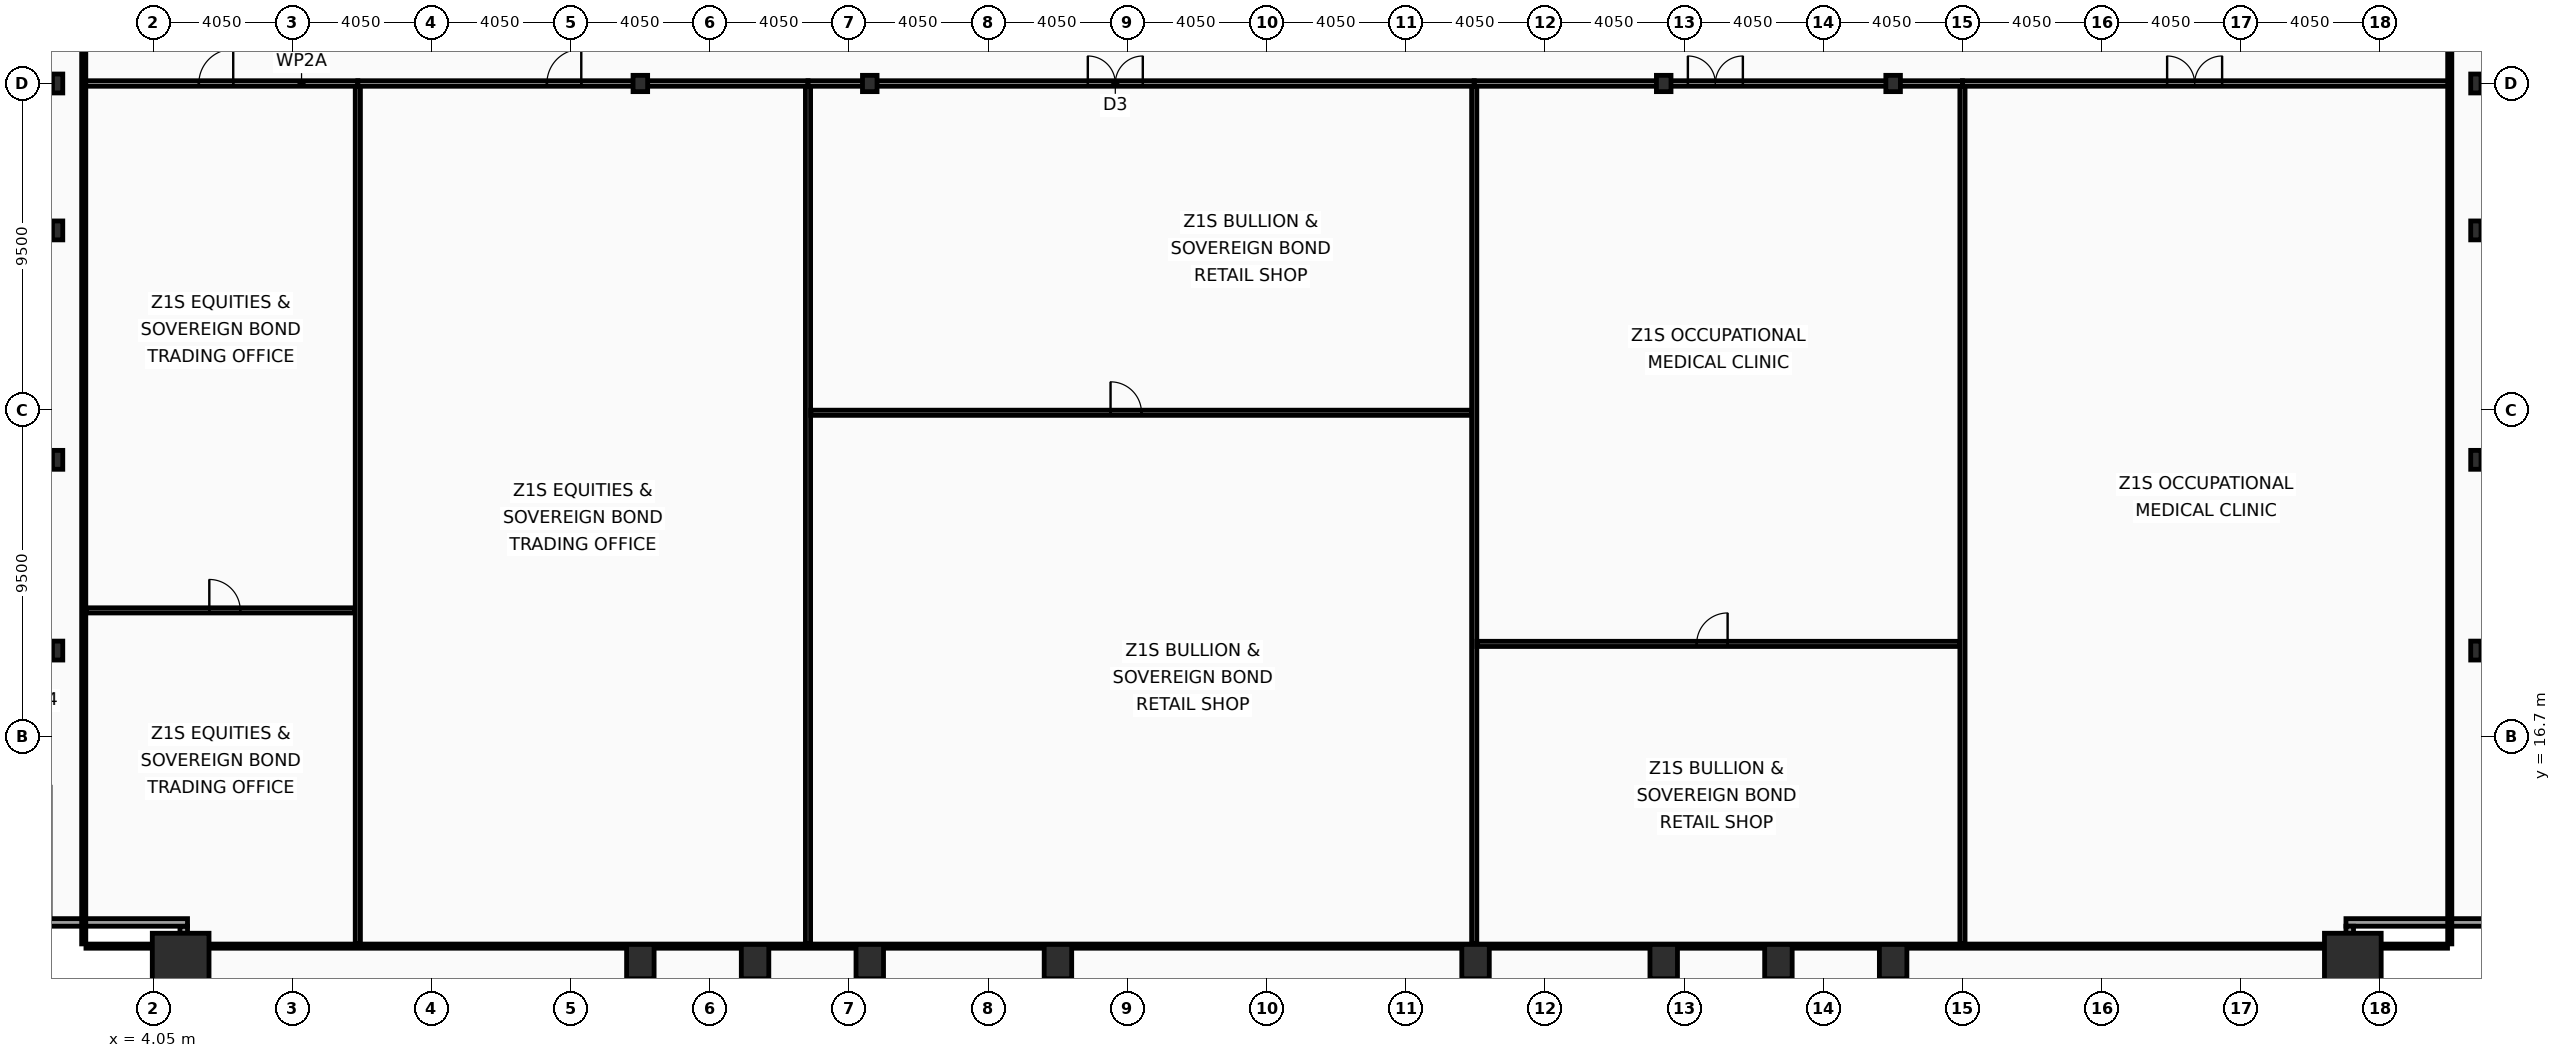
"""IFC4 building model, lengths in metres.
Left out: names, types, materials, properties, quantities, classifications, styles, units other than length and angle.
Written with IfcOpenShell. Run it as: python <this file> out.ifc"""

import sys

from ifc_helpers import new_model, si_unit, direction, frame, frame_2d, origin, origin_2d, place, context, subcontext, project, spatial, rectangle, hollow_rectangle, i_section, extrude, element, fill, save


model = new_model("IFC4")
c1 = context("Model", 3, precision=1e-05, world=origin(), true_north=direction((0.0, 1.0)))
c2 = subcontext(c1, "Body", "Model", "MODEL_VIEW")
j1 = project(units=[si_unit("LENGTHUNIT", "METRE"), si_unit("PLANEANGLEUNIT", "RADIAN")], contexts=[c1])
p1 = place(None, origin())
s1 = spatial("IfcSite", under=j1, at=p1, CompositionType="ELEMENT")
p2 = place(p1, origin())
s2 = spatial("IfcBuilding", under=s1, at=p2, CompositionType="ELEMENT")
p3 = place(p2, frame((0.0, 0.0, 33.8)))
s3 = spatial("IfcBuildingStorey", under=s2, at=p3, CompositionType="ELEMENT", Elevation=33.8)
for number, where, z_axis, x_axis in (
    (1, (4.85, 10.15, 0.0), (0.0, 0.0, 1.0), (1.0, 0.0, 0.0)),
    (2, (68.05, 10.15, 0.0), (0.0, 0.0, 1.0), (1.0, 0.0, 0.0)),
):
    element("IfcColumn", number, at=place(p3, frame(where, z_axis=z_axis, x_axis=x_axis)), inside=s3, PredefinedType="COLUMN", context=c2, shape_type="SweptSolid", body=[
        extrude(hollow_rectangle(XDim=1.65, YDim=1.65, WallThickness=0.075, at=origin_2d()), origin(), (0.0, 0.0, 1.0), 4.0),
    ])
for number, where, z_axis, x_axis in (
    (3, (18.225, 10.15, 0.0), (0.0, 0.0, 1.0), (1.0, 0.0, 0.0)),
    (4, (21.562, 10.15, 0.0), (0.0, 0.0, 1.0), (1.0, 0.0, 0.0)),
    (5, (24.9, 10.15, 0.0), (0.0, 0.0, 1.0), (1.0, 0.0, 0.0)),
    (6, (30.375, 10.15, 0.0), (0.0, 0.0, 1.0), (1.0, 0.0, 0.0)),
    (7, (42.525, 10.15, 0.0), (0.0, 0.0, 1.0), (1.0, 0.0, 0.0)),
    (8, (48.0, 10.15, 0.0), (0.0, 0.0, 1.0), (1.0, 0.0, 0.0)),
    (9, (51.337, 10.15, 0.0), (0.0, 0.0, 1.0), (1.0, 0.0, 0.0)),
    (10, (54.675, 10.15, 0.0), (0.0, 0.0, 1.0), (1.0, 0.0, 0.0)),
):
    element("IfcColumn", number, at=place(p3, frame(where, z_axis=z_axis, x_axis=x_axis)), inside=s3, PredefinedType="COLUMN", context=c2, shape_type="SweptSolid", body=[
        extrude(hollow_rectangle(XDim=0.8, YDim=1.0, WallThickness=0.055, at=origin_2d()), origin(), (0.0, 0.0, 1.0), 4.0),
    ])
for number, where, z_axis, x_axis in (
    (11, (1.27, 19.2, 0.0), (0.0, 0.0, 1.0), (1.0, 0.0, 0.0)),
    (12, (1.27, 24.75, 0.0), (0.0, 0.0, 1.0), (1.0, 0.0, 0.0)),
    (13, (1.27, 31.425, 0.0), (0.0, 0.0, 1.0), (1.0, 0.0, 0.0)),
    (14, (1.27, 35.7, 0.0), (0.0, 0.0, 1.0), (1.0, 0.0, 0.0)),
    (15, (71.63, 19.2, 0.0), (0.0, 0.0, 1.0), (1.0, 0.0, 0.0)),
    (16, (71.63, 24.75, 0.0), (0.0, 0.0, 1.0), (1.0, 0.0, 0.0)),
    (17, (71.63, 31.425, 0.0), (0.0, 0.0, 1.0), (1.0, 0.0, 0.0)),
    (18, (71.63, 35.7, 0.0), (0.0, 0.0, 1.0), (1.0, 0.0, 0.0)),
):
    element("IfcColumn", number, at=place(p3, frame(where, z_axis=z_axis, x_axis=x_axis)), inside=s3, PredefinedType="COLUMN", context=c2, shape_type="SweptSolid", body=[
        extrude(i_section(OverallWidth=0.3, OverallDepth=0.55, WebThickness=0.015, FlangeThickness=0.029, at=origin_2d()), origin(), (0.0, 0.0, 1.0), 4.0),
    ])
for number, where, z_axis, x_axis in (
    (19, (18.225, 35.7, 0.0), (0.0, 0.0, 1.0), (1.0, 0.0, 0.0)),
    (20, (24.9, 35.7, 0.0), (0.0, 0.0, 1.0), (1.0, 0.0, 0.0)),
    (21, (48.0, 35.7, 0.0), (0.0, 0.0, 1.0), (1.0, 0.0, 0.0)),
    (22, (54.675, 35.7, 0.0), (0.0, 0.0, 1.0), (1.0, 0.0, 0.0)),
):
    element("IfcColumn", number, at=place(p3, frame(where, z_axis=z_axis, x_axis=x_axis)), inside=s3, PredefinedType="COLUMN", context=c2, shape_type="SweptSolid", body=[
        extrude(i_section(OverallWidth=0.424, OverallDepth=0.474, WebThickness=0.048, FlangeThickness=0.077, at=origin_2d()), origin(), (0.0, 0.0, 1.0), 4.0),
    ])
p4 = place(p3, frame((4.94, 7.27, 0.0), z_axis=(0.0, 0.0, 1.0), x_axis=(0.0, 1.0, 0.0)))
e23 = element("IfcWall", 23, at=p4, inside=s3, PredefinedType="SOLIDWALL", context=c2, shape_type="SweptSolid", body=[
    extrude(rectangle(XDim=3.91, YDim=0.22, at=frame_2d((1.955, 0.0))), origin(), (0.0, 0.0, 1.0), 3.16),
])
for number, where, z_axis, x_axis in (
    (24, (5.05, 11.29, 0.0), (0.0, 0.0, 1.0), (-1.0, 0.0, 0.0)),
    (25, (72.07, 11.29, 0.0), (0.0, 0.0, 1.0), (-1.0, 0.0, 0.0)),
):
    element("IfcWall", number, at=place(p3, frame(where, z_axis=z_axis, x_axis=x_axis)), inside=s3, PredefinedType="SOLIDWALL", context=c2, shape_type="SweptSolid", body=[
        extrude(rectangle(XDim=4.22, YDim=0.22, at=frame_2d((2.11, 0.0))), origin(), (0.0, 0.0, 1.0), 3.16),
    ])
p5 = place(p3, frame((67.96, 11.18, 0.0), z_axis=(0.0, 0.0, 1.0), x_axis=(0.0, -1.0, 0.0)))
e26 = element("IfcWall", 26, at=p5, inside=s3, PredefinedType="SOLIDWALL", context=c2, shape_type="SweptSolid", body=[
    extrude(rectangle(XDim=3.91, YDim=0.22, at=frame_2d((1.955, 0.0))), origin(), (0.0, 0.0, 1.0), 3.16),
])
p6 = place(p3, frame((2.03, 35.7, 0.0), z_axis=(0.0, 0.0, 1.0), x_axis=(1.0, 0.0, 0.0)))
e27 = element("IfcWall", 27, at=p6, inside=s3, PredefinedType="PARTITIONING", context=c2, shape_type="SweptSolid", body=[
    extrude(rectangle(XDim=7.975, YDim=0.16, at=frame_2d((3.987, 0.0))), origin(), (0.0, 0.0, 1.0), 3.01),
])
p7 = place(p6, frame((3.35, 0.0, 0.0)))
e28 = element("IfcOpeningElement", 28, at=p7, cuts=e27, PredefinedType="OPENING", context=c2, shape_type="SweptSolid", body=[
    extrude(rectangle(XDim=1.0, YDim=2.05, at=frame_2d((0.5, 1.025))), frame((0.0, 0.09, 0.0), z_axis=(0.0, -1.0, 0.0), x_axis=(1.0, 0.0, 0.0)), (0.0, 0.0, 1.0), 0.18),
])
p8 = place(p3, frame((2.095, 20.369, 0.0), z_axis=(0.0, 0.0, 1.0), x_axis=(1.0, 0.0, 0.0)))
e29 = element("IfcWall", 29, at=p8, inside=s3, PredefinedType="PARTITIONING", context=c2, shape_type="SweptSolid", body=[
    extrude(rectangle(XDim=7.83, YDim=0.15, at=frame_2d((3.915, 0.0))), origin(), (0.0, 0.0, 1.0), 3.82),
])
p9 = place(p8, frame((3.589, 0.0, 0.0)))
e30 = element("IfcOpeningElement", 30, at=p9, cuts=e29, PredefinedType="OPENING", context=c2, shape_type="SweptSolid", body=[
    extrude(rectangle(XDim=0.9, YDim=2.05, at=frame_2d((0.45, 1.025))), frame((0.0, 0.085, 0.0), z_axis=(0.0, -1.0, 0.0), x_axis=(1.0, 0.0, 0.0)), (0.0, 0.0, 1.0), 0.17),
])
p10 = place(p3, frame((10.005, 35.7, 0.0), z_axis=(0.0, 0.0, 1.0), x_axis=(1.0, 0.0, 0.0)))
e31 = element("IfcWall", 31, at=p10, inside=s3, PredefinedType="PARTITIONING", context=c2, shape_type="SweptSolid", body=[
    extrude(rectangle(XDim=13.098, YDim=0.16, at=frame_2d((6.549, 0.0))), origin(), (0.0, 0.0, 1.0), 3.01),
])
p11 = place(p10, frame((5.501, 0.0, 0.0)))
e32 = element("IfcOpeningElement", 32, at=p11, cuts=e31, PredefinedType="OPENING", context=c2, shape_type="SweptSolid", body=[
    extrude(rectangle(XDim=1.0, YDim=2.05, at=frame_2d((0.5, 1.025))), frame((0.0, 0.09, 0.0), z_axis=(0.0, -1.0, 0.0), x_axis=(1.0, 0.0, 0.0)), (0.0, 0.0, 1.0), 0.18),
])
p12 = place(p3, frame((10.005, 10.665, 0.0), z_axis=(0.0, 0.0, 1.0), x_axis=(0.0, 1.0, 0.0)))
e33 = element("IfcWall", 33, at=p12, inside=s3, PredefinedType="PARTITIONING", context=c2, shape_type="SweptSolid", body=[
    extrude(rectangle(XDim=24.95, YDim=0.15, at=frame_2d((12.475, 0.0))), origin(), (0.0, 0.0, 1.0), 3.01),
])
p13 = place(p3, frame((23.103, 35.7, 0.0), z_axis=(0.0, 0.0, 1.0), x_axis=(1.0, 0.0, 0.0)))
e34 = element("IfcWall", 34, at=p13, inside=s3, PredefinedType="PARTITIONING", context=c2, shape_type="SweptSolid", body=[
    extrude(rectangle(XDim=19.384, YDim=0.16, at=frame_2d((9.692, 0.0))), origin(), (0.0, 0.0, 1.0), 3.01),
])
p14 = place(p13, frame((8.141, 0.0, 0.0)))
e35 = element("IfcOpeningElement", 35, at=p14, cuts=e34, PredefinedType="OPENING", context=c2, shape_type="SweptSolid", body=[
    extrude(rectangle(XDim=1.6, YDim=2.15, at=frame_2d((0.8, 1.075))), frame((0.0, 0.09, 0.0), z_axis=(0.0, -1.0, 0.0), x_axis=(1.0, 0.0, 0.0)), (0.0, 0.0, 1.0), 0.18),
])
p15 = place(p3, frame((23.103, 10.665, 0.0), z_axis=(0.0, 0.0, 1.0), x_axis=(0.0, 1.0, 0.0)))
e36 = element("IfcWall", 36, at=p15, inside=s3, PredefinedType="PARTITIONING", context=c2, shape_type="SweptSolid", body=[
    extrude(rectangle(XDim=24.95, YDim=0.15, at=frame_2d((12.475, 0.0))), origin(), (0.0, 0.0, 1.0), 3.21),
])
p16 = place(p3, frame((23.183, 26.119, 0.0), z_axis=(0.0, 0.0, 1.0), x_axis=(1.0, 0.0, 0.0)))
e37 = element("IfcWall", 37, at=p16, inside=s3, PredefinedType="PARTITIONING", context=c2, shape_type="SweptSolid", body=[
    extrude(rectangle(XDim=19.224, YDim=0.15, at=frame_2d((9.612, 0.0))), origin(), (0.0, 0.0, 1.0), 3.01),
])
p17 = place(p16, frame((8.723, 0.0, 0.0)))
e38 = element("IfcOpeningElement", 38, at=p17, cuts=e37, PredefinedType="OPENING", context=c2, shape_type="SweptSolid", body=[
    extrude(rectangle(XDim=0.9, YDim=2.05, at=frame_2d((0.45, 1.025))), frame((0.0, 0.085, 0.0), z_axis=(0.0, -1.0, 0.0), x_axis=(1.0, 0.0, 0.0)), (0.0, 0.0, 1.0), 0.17),
])
p18 = place(p3, frame((42.487, 35.7, 0.0), z_axis=(0.0, 0.0, 1.0), x_axis=(1.0, 0.0, 0.0)))
e39 = element("IfcWall", 39, at=p18, inside=s3, PredefinedType="PARTITIONING", context=c2, shape_type="SweptSolid", body=[
    extrude(rectangle(XDim=14.205, YDim=0.16, at=frame_2d((7.103, 0.0))), origin(), (0.0, 0.0, 1.0), 3.01),
])
p19 = place(p18, frame((6.216, 0.0, 0.0)))
e40 = element("IfcOpeningElement", 40, at=p19, cuts=e39, PredefinedType="OPENING", context=c2, shape_type="SweptSolid", body=[
    extrude(rectangle(XDim=1.6, YDim=2.15, at=frame_2d((0.8, 1.075))), frame((0.0, 0.09, 0.0), z_axis=(0.0, -1.0, 0.0), x_axis=(1.0, 0.0, 0.0)), (0.0, 0.0, 1.0), 0.18),
])
p20 = place(p3, frame((42.487, 10.665, 0.0), z_axis=(0.0, 0.0, 1.0), x_axis=(0.0, 1.0, 0.0)))
e41 = element("IfcWall", 41, at=p20, inside=s3, PredefinedType="PARTITIONING", context=c2, shape_type="SweptSolid", body=[
    extrude(rectangle(XDim=24.95, YDim=0.15, at=frame_2d((12.475, 0.0))), origin(), (0.0, 0.0, 1.0), 3.01),
])
p21 = place(p3, frame((42.567, 19.395, 0.0), z_axis=(0.0, 0.0, 1.0), x_axis=(1.0, 0.0, 0.0)))
e42 = element("IfcWall", 42, at=p21, inside=s3, PredefinedType="PARTITIONING", context=c2, shape_type="SweptSolid", body=[
    extrude(rectangle(XDim=14.046, YDim=0.15, at=frame_2d((7.023, 0.0))), origin(), (0.0, 0.0, 1.0), 3.01),
])
p22 = place(p21, frame((6.393, 0.0, 0.0)))
e43 = element("IfcOpeningElement", 43, at=p22, cuts=e42, PredefinedType="OPENING", context=c2, shape_type="SweptSolid", body=[
    extrude(rectangle(XDim=0.9, YDim=2.05, at=frame_2d((0.45, 1.025))), frame((0.0, 0.085, 0.0), z_axis=(0.0, -1.0, 0.0), x_axis=(1.0, 0.0, 0.0)), (0.0, 0.0, 1.0), 0.17),
])
p23 = place(p3, frame((56.692, 35.7, 0.0), z_axis=(0.0, 0.0, 1.0), x_axis=(1.0, 0.0, 0.0)))
e44 = element("IfcWall", 44, at=p23, inside=s3, PredefinedType="PARTITIONING", context=c2, shape_type="SweptSolid", body=[
    extrude(rectangle(XDim=14.178, YDim=0.16, at=frame_2d((7.089, 0.0))), origin(), (0.0, 0.0, 1.0), 3.01),
])
p24 = place(p23, frame((5.955, 0.0, 0.0)))
e45 = element("IfcOpeningElement", 45, at=p24, cuts=e44, PredefinedType="OPENING", context=c2, shape_type="SweptSolid", body=[
    extrude(rectangle(XDim=1.6, YDim=2.15, at=frame_2d((0.8, 1.075))), frame((0.0, 0.09, 0.0), z_axis=(0.0, -1.0, 0.0), x_axis=(1.0, 0.0, 0.0)), (0.0, 0.0, 1.0), 0.18),
])
p25 = place(p3, frame((56.692, 10.665, 0.0), z_axis=(0.0, 0.0, 1.0), x_axis=(0.0, 1.0, 0.0)))
e46 = element("IfcWall", 46, at=p25, inside=s3, PredefinedType="PARTITIONING", context=c2, shape_type="SweptSolid", body=[
    extrude(rectangle(XDim=24.95, YDim=0.15, at=frame_2d((12.475, 0.0))), origin(), (0.0, 0.0, 1.0), 3.01),
])
for number, where, z_axis, x_axis in (
    (47, (2.03, 10.665, 0.0), (0.0, 0.0, 1.0), (0.0, 1.0, 0.0)),
    (48, (70.87, 10.665, 0.0), (0.0, 0.0, 1.0), (0.0, 1.0, 0.0)),
):
    element("IfcWall", number, at=place(p3, frame(where, z_axis=z_axis, x_axis=x_axis)), inside=s3, PredefinedType="PARTITIONING", context=c2, shape_type="SweptSolid", body=[
        extrude(rectangle(XDim=42.11, YDim=0.12, at=frame_2d((21.055, 0.0))), origin(), (0.0, 0.0, 1.0), 3.01),
    ])
p26 = place(p3, frame((2.095, 10.6, 0.0), z_axis=(0.0, 0.0, 1.0), x_axis=(1.0, 0.0, 0.0)))
e49 = element("IfcWall", 49, at=p26, inside=s3, PredefinedType="PARTITIONING", context=c2, shape_type="SweptSolid", body=[
    extrude(rectangle(XDim=68.71, YDim=0.12, at=frame_2d((34.355, 0.0))), origin(), (0.0, 0.0, 1.0), 3.01),
])
p27 = place(p7, origin())
e50 = element("IfcDoor", 50, at=p27, inside=s3, OperationType="SINGLE_SWING_RIGHT", PredefinedType="DOOR", context=c2, shape_type="SweptSolid", body=[
    extrude(rectangle(XDim=1.0, YDim=2.05, at=frame_2d((0.5, 1.025))), frame((0.0, 0.025, 0.0), z_axis=(0.0, -1.0, 0.0), x_axis=(1.0, 0.0, 0.0)), (0.0, 0.0, 1.0), 0.05),
])
fill(e28, e50)
p28 = place(p9, origin())
e51 = element("IfcDoor", 51, at=p28, inside=s3, OperationType="SINGLE_SWING_LEFT", PredefinedType="DOOR", context=c2, shape_type="SweptSolid", body=[
    extrude(rectangle(XDim=0.9, YDim=2.05, at=frame_2d((0.45, 1.025))), frame((0.0, 0.025, 0.0), z_axis=(0.0, -1.0, 0.0), x_axis=(1.0, 0.0, 0.0)), (0.0, 0.0, 1.0), 0.05),
])
fill(e30, e51)
p29 = place(p11, origin())
e52 = element("IfcDoor", 52, at=p29, inside=s3, OperationType="SINGLE_SWING_RIGHT", PredefinedType="DOOR", context=c2, shape_type="SweptSolid", body=[
    extrude(rectangle(XDim=1.0, YDim=2.05, at=frame_2d((0.5, 1.025))), frame((0.0, 0.025, 0.0), z_axis=(0.0, -1.0, 0.0), x_axis=(1.0, 0.0, 0.0)), (0.0, 0.0, 1.0), 0.05),
])
fill(e32, e52)
p30 = place(p14, origin())
e53 = element("IfcDoor", 53, at=p30, inside=s3, OperationType="DOUBLE_DOOR_SINGLE_SWING", PredefinedType="DOOR", context=c2, shape_type="SweptSolid", body=[
    extrude(rectangle(XDim=1.6, YDim=2.15, at=frame_2d((0.8, 1.075))), frame((0.0, 0.025, 0.0), z_axis=(0.0, -1.0, 0.0), x_axis=(1.0, 0.0, 0.0)), (0.0, 0.0, 1.0), 0.05),
])
fill(e35, e53)
p31 = place(p17, origin())
e54 = element("IfcDoor", 54, at=p31, inside=s3, OperationType="SINGLE_SWING_LEFT", PredefinedType="DOOR", context=c2, shape_type="SweptSolid", body=[
    extrude(rectangle(XDim=0.9, YDim=2.05, at=frame_2d((0.45, 1.025))), frame((0.0, 0.025, 0.0), z_axis=(0.0, -1.0, 0.0), x_axis=(1.0, 0.0, 0.0)), (0.0, 0.0, 1.0), 0.05),
])
fill(e38, e54)
p32 = place(p19, origin())
e55 = element("IfcDoor", 55, at=p32, inside=s3, OperationType="DOUBLE_DOOR_SINGLE_SWING", PredefinedType="DOOR", context=c2, shape_type="SweptSolid", body=[
    extrude(rectangle(XDim=1.6, YDim=2.15, at=frame_2d((0.8, 1.075))), frame((0.0, 0.025, 0.0), z_axis=(0.0, -1.0, 0.0), x_axis=(1.0, 0.0, 0.0)), (0.0, 0.0, 1.0), 0.05),
])
fill(e40, e55)
p33 = place(p22, origin())
e56 = element("IfcDoor", 56, at=p33, inside=s3, OperationType="SINGLE_SWING_RIGHT", PredefinedType="DOOR", context=c2, shape_type="SweptSolid", body=[
    extrude(rectangle(XDim=0.9, YDim=2.05, at=frame_2d((0.45, 1.025))), frame((0.0, 0.025, 0.0), z_axis=(0.0, -1.0, 0.0), x_axis=(1.0, 0.0, 0.0)), (0.0, 0.0, 1.0), 0.05),
])
fill(e43, e56)
p34 = place(p24, origin())
e57 = element("IfcDoor", 57, at=p34, inside=s3, OperationType="DOUBLE_DOOR_SINGLE_SWING", PredefinedType="DOOR", context=c2, shape_type="SweptSolid", body=[
    extrude(rectangle(XDim=1.6, YDim=2.15, at=frame_2d((0.8, 1.075))), frame((0.0, 0.025, 0.0), z_axis=(0.0, -1.0, 0.0), x_axis=(1.0, 0.0, 0.0)), (0.0, 0.0, 1.0), 0.05),
])
fill(e45, e57)
save(model, sys.argv[1])
